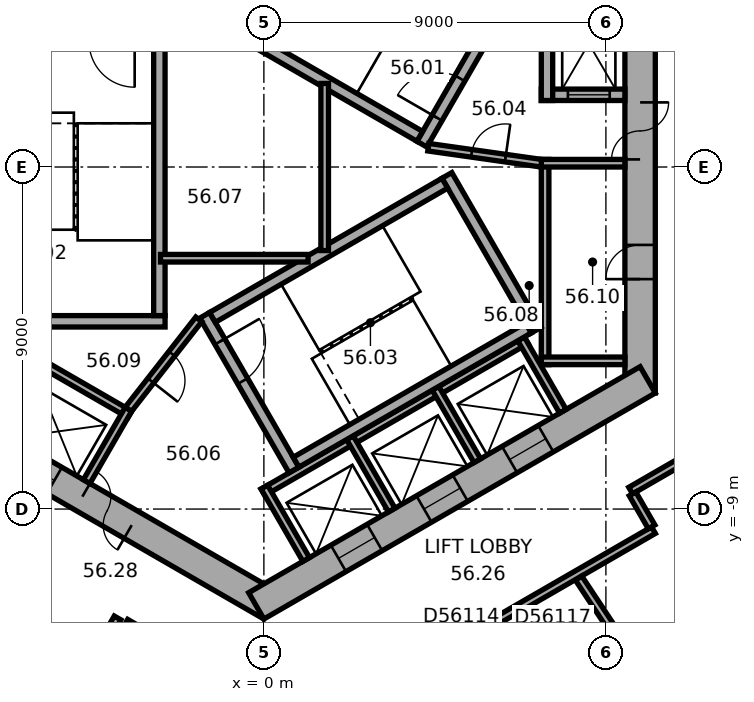
"""IFC4 building model, lengths in metres.
Left out: names, types, materials, properties, quantities, classifications, styles, units other than length and angle.
Written with IfcOpenShell. Run it as: python <this file> out.ifc"""

import sys

from ifc_helpers import new_model, si_unit, direction, frame, frame_2d, origin, place, context, subcontext, project, spatial, rectangle, extrude, element, fill, save


model = new_model("IFC4")
c1 = context("Model", 3, precision=1e-05, world=origin(), true_north=direction((0.0, 1.0)))
c2 = subcontext(c1, "Body", "Model", "MODEL_VIEW")
j1 = project(units=[si_unit("LENGTHUNIT", "METRE"), si_unit("PLANEANGLEUNIT", "RADIAN")], contexts=[c1])
p1 = place(None, origin())
s1 = spatial("IfcSite", under=j1, at=p1, CompositionType="ELEMENT")
p2 = place(p1, origin())
s2 = spatial("IfcBuilding", under=s1, at=p2, CompositionType="ELEMENT")
p3 = place(p2, frame((0.0, 0.0, 229.1)))
s3 = spatial("IfcBuildingStorey", under=s2, at=p3, CompositionType="ELEMENT", Elevation=229.1)
p4 = place(p3, frame((9.9, -5.947, 0.0), z_axis=(0.0, 0.0, 1.0), x_axis=(0.0, 1.0, 0.0)))
e1 = element("IfcWall", 1, at=p4, inside=s3, PredefinedType="SHEAR", context=c2, shape_type="SweptSolid", body=[
    extrude(rectangle(XDim=11.894, YDim=0.8, at=frame_2d((5.947, 0.0))), origin(), (0.0, 0.0, 1.0), 3.7),
])
p5 = place(p4, frame((6.147, 0.0, 0.0)))
e2 = element("IfcOpeningElement", 2, at=p5, cuts=e1, PredefinedType="OPENING", context=c2, shape_type="SweptSolid", body=[
    extrude(rectangle(XDim=1.5, YDim=2.1, at=frame_2d((0.75, 1.05))), frame((0.0, 0.41, 0.0), z_axis=(0.0, -1.0, 0.0), x_axis=(1.0, 0.0, 0.0)), (0.0, 0.0, 1.0), 0.82),
])
p6 = place(p4, frame((2.997, 0.0, 0.0)))
e3 = element("IfcOpeningElement", 3, at=p6, cuts=e1, PredefinedType="OPENING", context=c2, shape_type="SweptSolid", body=[
    extrude(rectangle(XDim=0.9, YDim=2.1, at=frame_2d((0.45, 1.05))), frame((0.0, 0.41, 0.0), z_axis=(0.0, -1.0, 0.0), x_axis=(1.0, 0.0, 0.0)), (0.0, 0.0, 1.0), 0.82),
])
p7 = place(p3, frame((-10.1, -5.6, 0.0), z_axis=(0.0, 0.0, 1.0), x_axis=(0.866023897231, -0.500002609418, 0.0)))
e4 = element("IfcWall", 4, at=p7, inside=s3, PredefinedType="SHEAR", context=c2, shape_type="SweptSolid", body=[
    extrude(rectangle(XDim=11.894, YDim=0.8, at=frame_2d((5.947, 0.0))), origin(), (0.0, 0.0, 1.0), 3.7),
])
p8 = place(p7, frame((6.147, 0.0, 0.0)))
e5 = element("IfcOpeningElement", 5, at=p8, cuts=e4, PredefinedType="OPENING", context=c2, shape_type="SweptSolid", body=[
    extrude(rectangle(XDim=1.5, YDim=2.1, at=frame_2d((0.75, 1.05))), frame((0.0, 0.41, 0.0), z_axis=(0.0, -1.0, 0.0), x_axis=(1.0, 0.0, 0.0)), (0.0, 0.0, 1.0), 0.82),
])
p9 = place(p7, frame((1.597, 0.0, 0.0)))
e6 = element("IfcOpeningElement", 6, at=p9, cuts=e4, PredefinedType="OPENING", context=c2, shape_type="SweptSolid", body=[
    extrude(rectangle(XDim=1.1, YDim=2.1, at=frame_2d((0.55, 1.05))), frame((0.0, 0.41, 0.0), z_axis=(0.0, -1.0, 0.0), x_axis=(1.0, 0.0, 0.0)), (0.0, 0.0, 1.0), 0.82),
])
p10 = place(p7, frame((4.197, 0.0, 0.0)))
e7 = element("IfcOpeningElement", 7, at=p10, cuts=e4, PredefinedType="OPENING", context=c2, shape_type="SweptSolid", body=[
    extrude(rectangle(XDim=1.1, YDim=2.1, at=frame_2d((0.55, 1.05))), frame((0.0, 0.41, 0.0), z_axis=(0.0, -1.0, 0.0), x_axis=(1.0, 0.0, 0.0)), (0.0, 0.0, 1.0), 0.82),
])
p11 = place(p3, frame((-0.2, -11.547, 0.0), z_axis=(0.0, 0.0, 1.0), x_axis=(0.866023897231, 0.500002609418, 0.0)))
e8 = element("IfcWall", 8, at=p11, inside=s3, PredefinedType="SHEAR", context=c2, shape_type="SweptSolid", body=[
    extrude(rectangle(XDim=11.894, YDim=0.8, at=frame_2d((5.947, 0.0))), origin(), (0.0, 0.0, 1.0), 3.7),
])
p12 = place(p11, frame((2.497, 0.0, 0.0)))
e9 = element("IfcOpeningElement", 9, at=p12, cuts=e8, PredefinedType="OPENING", context=c2, shape_type="SweptSolid", body=[
    extrude(rectangle(XDim=1.1, YDim=2.1, at=frame_2d((0.55, 1.05))), frame((0.0, 0.41, 0.0), z_axis=(0.0, -1.0, 0.0), x_axis=(1.0, 0.0, 0.0)), (0.0, 0.0, 1.0), 0.82),
])
p13 = place(p11, frame((5.097, 0.0, 0.0)))
e10 = element("IfcOpeningElement", 10, at=p13, cuts=e8, PredefinedType="OPENING", context=c2, shape_type="SweptSolid", body=[
    extrude(rectangle(XDim=1.1, YDim=2.1, at=frame_2d((0.55, 1.05))), frame((0.0, 0.41, 0.0), z_axis=(0.0, -1.0, 0.0), x_axis=(1.0, 0.0, 0.0)), (0.0, 0.0, 1.0), 0.82),
])
p14 = place(p11, frame((7.697, 0.0, 0.0)))
e11 = element("IfcOpeningElement", 11, at=p14, cuts=e8, PredefinedType="OPENING", context=c2, shape_type="SweptSolid", body=[
    extrude(rectangle(XDim=1.1, YDim=2.1, at=frame_2d((0.55, 1.05))), frame((0.0, 0.41, 0.0), z_axis=(0.0, -1.0, 0.0), x_axis=(1.0, 0.0, 0.0)), (0.0, 0.0, 1.0), 0.82),
])
p15 = place(p3, frame((7.4, -5.2, 0.0), z_axis=(0.0, 0.0, 1.0), x_axis=(0.0, 1.0, 0.0)))
e12 = element("IfcWall", 12, at=p15, inside=s3, PredefinedType="PARTITIONING", context=c2, shape_type="SweptSolid", body=[
    extrude(rectangle(XDim=5.4, YDim=0.2, at=frame_2d((2.7, 0.0))), origin(), (0.0, 0.0, 1.0), 3.42),
])
for number, where, z_axis, x_axis in (
    (13, (7.3, -5.1, 0.0), (0.0, 0.0, 1.0), (1.0, 0.0, 0.0)),
    (14, (7.3, 0.1, 0.0), (0.0, 0.0, 1.0), (1.0, 0.0, 0.0)),
):
    element("IfcWall", number, at=place(p3, frame(where, z_axis=z_axis, x_axis=x_axis)), inside=s3, PredefinedType="PARTITIONING", context=c2, shape_type="SweptSolid", body=[
        extrude(rectangle(XDim=2.2, YDim=0.2, at=frame_2d((1.1, 0.0))), origin(), (0.0, 0.0, 1.0), 3.42),
    ])
p16 = place(p3, frame((-8.203, -3.809, 0.0), z_axis=(0.0, 0.0, 1.0), x_axis=(0.866028230842, -0.499995103361, 0.0)))
e15 = element("IfcWall", 15, at=p16, inside=s3, PredefinedType="PARTITIONING", context=c2, shape_type="SweptSolid", body=[
    extrude(rectangle(XDim=5.4, YDim=0.2, at=frame_2d((2.7, 0.0))), origin(), (0.0, 0.0, 1.0), 3.42),
])
p17 = place(p3, frame((-3.563, -6.372, 0.0), z_axis=(0.0, 0.0, 1.0), x_axis=(-0.499994660107, -0.866028486751, 0.0)))
e16 = element("IfcWall", 16, at=p17, inside=s3, PredefinedType="PARTITIONING", context=c2, shape_type="SweptSolid", body=[
    extrude(rectangle(XDim=2.2, YDim=0.2, at=frame_2d((1.1, 0.0))), origin(), (0.0, 0.0, 1.0), 3.42),
])
p18 = place(p3, frame((-0.024, -8.559, 0.0), z_axis=(0.0, 0.0, 1.0), x_axis=(0.866026010844, 0.49999894854, 0.0)))
e17 = element("IfcWall", 17, at=p18, inside=s3, PredefinedType="PARTITIONING", context=c2, shape_type="SweptSolid", body=[
    extrude(rectangle(XDim=8.0, YDim=0.2, at=frame_2d((4.0, 0.0))), origin(), (0.0, 0.0, 1.0), 3.42),
])
for number, where, z_axis, x_axis in (
    (18, (0.013, -8.422, 0.0), (0.0, 0.0, 1.0), (0.5, -0.866, 0.0)),
    (19, (2.264, -7.122, 0.0), (0.0, 0.0, 1.0), (0.5, -0.866, 0.0)),
    (20, (4.516, -5.822, 0.0), (0.0, 0.0, 1.0), (0.5, -0.866, 0.0)),
    (21, (6.768, -4.522, 0.0), (0.0, 0.0, 1.0), (0.5, -0.866, 0.0)),
):
    element("IfcWall", number, at=place(p3, frame(where, z_axis=z_axis, x_axis=x_axis)), inside=s3, PredefinedType="PARTITIONING", context=c2, shape_type="SweptSolid", body=[
        extrude(rectangle(XDim=2.2, YDim=0.2, at=frame_2d((1.1, 0.0))), origin(), (0.0, 0.0, 1.0), 3.42),
    ])
p19 = place(p3, frame((4.158, 0.602, 0.0), z_axis=(0.0, 0.0, 1.0), x_axis=(0.499977259774, 0.866038532462, 0.0)))
e22 = element("IfcWall", 22, at=p19, inside=s3, PredefinedType="SHEAR", context=c2, shape_type="SweptSolid", body=[
    extrude(rectangle(XDim=4.7, YDim=0.3, at=frame_2d((2.35, 0.0))), origin(), (0.0, 0.0, 1.0), 3.42),
])
p20 = place(p19, frame((0.8, 0.0, 0.0)))
e23 = element("IfcOpeningElement", 23, at=p20, cuts=e22, PredefinedType="OPENING", context=c2, shape_type="SweptSolid", body=[
    extrude(rectangle(XDim=1.2, YDim=2.1, at=frame_2d((0.6, 1.05))), frame((0.0, 0.16, 0.0), z_axis=(0.0, -1.0, 0.0), x_axis=(1.0, 0.0, 0.0)), (0.0, 0.0, 1.0), 0.32),
])
p21 = place(p3, frame((4.103, 0.807, 0.0), z_axis=(0.0, 0.0, 1.0), x_axis=(-0.866027801685, 0.499995846692, 0.0)))
e24 = element("IfcWall", 24, at=p21, inside=s3, PredefinedType="SHEAR", context=c2, shape_type="SweptSolid", body=[
    extrude(rectangle(XDim=7.06, YDim=0.3, at=frame_2d((3.53, 0.0))), origin(), (0.0, 0.0, 1.0), 3.42),
])
p22 = place(p3, frame((-2.6, -4.06, 0.0), z_axis=(0.0, 0.0, 1.0), x_axis=(-1.0, 0.0, 0.0)))
e25 = element("IfcWall", 25, at=p22, inside=s3, PredefinedType="SHEAR", context=c2, shape_type="SweptSolid", body=[
    extrude(rectangle(XDim=4.7, YDim=0.3, at=frame_2d((2.35, 0.0))), origin(), (0.0, 0.0, 1.0), 3.42),
])
p23 = place(p3, frame((-2.75, 3.15, 0.0), z_axis=(0.0, 0.0, 1.0), x_axis=(0.0, -1.0, 0.0)))
e26 = element("IfcWall", 26, at=p23, inside=s3, PredefinedType="SHEAR", context=c2, shape_type="SweptSolid", body=[
    extrude(rectangle(XDim=7.06, YDim=0.3, at=frame_2d((3.53, 0.0))), origin(), (0.0, 0.0, 1.0), 3.42),
])
p24 = place(p3, frame((-1.558, -3.902, 0.0), z_axis=(0.0, 0.0, 1.0), x_axis=(0.499977259774, -0.866038532462, 0.0)))
e27 = element("IfcWall", 27, at=p24, inside=s3, PredefinedType="SHEAR", context=c2, shape_type="SweptSolid", body=[
    extrude(rectangle(XDim=4.7, YDim=0.3, at=frame_2d((2.35, 0.0))), origin(), (0.0, 0.0, 1.0), 3.42),
])
p25 = place(p24, frame((0.8, 0.0, 0.0)))
e28 = element("IfcOpeningElement", 28, at=p25, cuts=e27, PredefinedType="OPENING", context=c2, shape_type="SweptSolid", body=[
    extrude(rectangle(XDim=1.2, YDim=2.1, at=frame_2d((0.6, 1.05))), frame((0.0, 0.16, 0.0), z_axis=(0.0, -1.0, 0.0), x_axis=(1.0, 0.0, 0.0)), (0.0, 0.0, 1.0), 0.32),
])
p26 = place(p3, frame((4.816, -0.222, 0.0), z_axis=(0.0, 0.0, 1.0), x_axis=(0.499977259774, -0.866038532462, 0.0)))
e29 = element("IfcWall", 29, at=p26, inside=s3, PredefinedType="SHEAR", context=c2, shape_type="SweptSolid", body=[
    extrude(rectangle(XDim=4.7, YDim=0.3, at=frame_2d((2.35, 0.0))), origin(), (0.0, 0.0, 1.0), 3.42),
])
for number, where, z_axis, x_axis in (
    (30, (-1.353, -3.957, 0.0), (0.0, 0.0, 1.0), (0.866, 0.5, 0.0)),
    (31, (0.847, -7.767, 0.0), (0.0, 0.0, 1.0), (0.866, 0.5, 0.0)),
):
    element("IfcWall", number, at=place(p3, frame(where, z_axis=z_axis, x_axis=x_axis)), inside=s3, PredefinedType="SHEAR", context=c2, shape_type="SweptSolid", body=[
        extrude(rectangle(XDim=7.06, YDim=0.3, at=frame_2d((3.53, 0.0))), origin(), (0.0, 0.0, 1.0), 3.42),
    ])
p27 = place(p3, frame((7.3, 1.9, 0.0), z_axis=(0.0, 0.0, 1.0), x_axis=(1.0, 0.0, 0.0)))
e32 = element("IfcWall", 32, at=p27, inside=s3, PredefinedType="SHEAR", context=c2, shape_type="SweptSolid", body=[
    extrude(rectangle(XDim=2.2, YDim=0.3, at=frame_2d((1.1, 0.0))), origin(), (0.0, 0.0, 1.0), 3.42),
])
p28 = place(p27, frame((0.7, 0.0, 0.0)))
e33 = element("IfcOpeningElement", 33, at=p28, cuts=e32, PredefinedType="OPENING", context=c2, shape_type="SweptSolid", body=[
    extrude(rectangle(XDim=1.1, YDim=2.1, at=frame_2d((0.55, 1.05))), frame((0.0, 0.16, 0.0), z_axis=(0.0, -1.0, 0.0), x_axis=(1.0, 0.0, 0.0)), (0.0, 0.0, 1.0), 0.32),
])
p29 = place(p3, frame((7.45, 1.75, 0.0), z_axis=(0.0, 0.0, 1.0), x_axis=(0.0, 1.0, 0.0)))
e34 = element("IfcWall", 34, at=p29, inside=s3, PredefinedType="SHEAR", context=c2, shape_type="SweptSolid", body=[
    extrude(rectangle(XDim=3.35, YDim=0.3, at=frame_2d((1.675, 0.0))), origin(), (0.0, 0.0, 1.0), 3.42),
])
p30 = place(p3, frame((4.327, 0.521, 0.0), z_axis=(0.0, 0.0, 1.0), x_axis=(0.990124376366, -0.14019172346, 0.0)))
e35 = element("IfcWall", 35, at=p30, inside=s3, PredefinedType="PARTITIONING", context=c2, shape_type="SweptSolid", body=[
    extrude(rectangle(XDim=3.002, YDim=0.2, at=frame_2d((1.501, 0.0))), origin(), (0.0, 0.0, 1.0), 3.42),
])
p31 = place(p30, frame((1.15, 0.0, 0.0)))
e36 = element("IfcOpeningElement", 36, at=p31, cuts=e35, PredefinedType="OPENING", context=c2, shape_type="SweptSolid", body=[
    extrude(rectangle(XDim=0.9, YDim=2.1, at=frame_2d((0.45, 1.05))), frame((0.0, 0.11, 0.0), z_axis=(0.0, -1.0, 0.0), x_axis=(1.0, 0.0, 0.0)), (0.0, 0.0, 1.0), 0.22),
])
p32 = place(p3, frame((-1.712, -4.008, 0.0), z_axis=(0.0, 0.0, 1.0), x_axis=(-0.616549420702, -0.787316208287, 0.0)))
e37 = element("IfcWall", 37, at=p32, inside=s3, PredefinedType="PARTITIONING", context=c2, shape_type="SweptSolid", body=[
    extrude(rectangle(XDim=3.002, YDim=0.2, at=frame_2d((1.501, 0.0))), origin(), (0.0, 0.0, 1.0), 3.42),
])
p33 = place(p32, frame((1.15, 0.0, 0.0)))
e38 = element("IfcOpeningElement", 38, at=p33, cuts=e37, PredefinedType="OPENING", context=c2, shape_type="SweptSolid", body=[
    extrude(rectangle(XDim=0.9, YDim=2.1, at=frame_2d((0.45, 1.05))), frame((0.0, 0.11, 0.0), z_axis=(0.0, -1.0, 0.0), x_axis=(1.0, 0.0, 0.0)), (0.0, 0.0, 1.0), 0.22),
])
p34 = place(p3, frame((-2.72, -2.4, 0.0), z_axis=(0.0, 0.0, 1.0), x_axis=(1.0, 0.0, 0.0)))
e39 = element("IfcWall", 39, at=p34, inside=s3, PredefinedType="PARTITIONING", context=c2, shape_type="SweptSolid", body=[
    extrude(rectangle(XDim=3.883, YDim=0.2, at=frame_2d((1.941, 0.0))), origin(), (0.0, 0.0, 1.0), 3.42),
])
p35 = place(p3, frame((1.6, -2.198, 0.0), z_axis=(0.0, 0.0, 1.0), x_axis=(0.0, 1.0, 0.0)))
e40 = element("IfcWall", 40, at=p35, inside=s3, PredefinedType="PARTITIONING", context=c2, shape_type="SweptSolid", body=[
    extrude(rectangle(XDim=4.397, YDim=0.2, at=frame_2d((2.198, 0.0))), origin(), (0.0, 0.0, 1.0), 3.42),
])
p36 = place(p3, frame((-7.525, -18.23, 0.0), z_axis=(0.0, 0.0, 1.0), x_axis=(0.499983153418, 0.866035129944, 0.0)))
e41 = element("IfcWall", 41, at=p36, inside=s3, PredefinedType="PARTITIONING", context=c2, shape_type="SweptSolid", body=[
    extrude(rectangle(XDim=7.35, YDim=0.2, at=frame_2d((3.675, 0.0))), origin(), (0.0, 0.0, 1.0), 3.42),
])
p37 = place(p36, frame((2.975, 0.0, 0.0)))
e42 = element("IfcOpeningElement", 42, at=p37, cuts=e41, PredefinedType="OPENING", context=c2, shape_type="SweptSolid", body=[
    extrude(rectangle(XDim=1.0, YDim=2.1, at=frame_2d((0.5, 1.05))), frame((0.0, 0.11, 0.0), z_axis=(0.0, -1.0, 0.0), x_axis=(1.0, 0.0, 0.0)), (0.0, 0.0, 1.0), 0.22),
])
p38 = place(p3, frame((-3.634, -11.99, 0.0), z_axis=(0.0, 0.0, 1.0), x_axis=(0.866018616679, -0.500011755427, 0.0)))
e43 = element("IfcWall", 43, at=p38, inside=s3, PredefinedType="PARTITIONING", context=c2, shape_type="SweptSolid", body=[
    extrude(rectangle(XDim=2.8, YDim=0.2, at=frame_2d((1.4, 0.0))), origin(), (0.0, 0.0, 1.0), 3.42),
])
p39 = place(p3, frame((2.716, -13.906, 0.0), z_axis=(0.0, 0.0, 1.0), x_axis=(0.866040290674, 0.499974214264, 0.0)))
e44 = element("IfcWall", 44, at=p39, inside=s3, PredefinedType="PARTITIONING", context=c2, shape_type="SweptSolid", body=[
    extrude(rectangle(XDim=8.702, YDim=0.2, at=frame_2d((4.351, 0.0))), origin(), (0.0, 0.0, 1.0), 3.42),
])
p40 = place(p39, frame((2.679, 0.0, 0.0)))
e45 = element("IfcOpeningElement", 45, at=p40, cuts=e44, PredefinedType="OPENING", context=c2, shape_type="SweptSolid", body=[
    extrude(rectangle(XDim=1.0, YDim=2.1, at=frame_2d((0.5, 1.05))), frame((0.0, 0.11, 0.0), z_axis=(0.0, -1.0, 0.0), x_axis=(1.0, 0.0, 0.0)), (0.0, 0.0, 1.0), 0.22),
])
p41 = place(p3, frame((9.652, -8.515, 0.0), z_axis=(0.0, 0.0, 1.0), x_axis=(0.866020375458, 0.500008709215, 0.0)))
e46 = element("IfcWall", 46, at=p41, inside=s3, PredefinedType="PARTITIONING", context=c2, shape_type="SweptSolid", body=[
    extrude(rectangle(XDim=1.846, YDim=0.2, at=frame_2d((0.923, 0.0))), origin(), (0.0, 0.0, 1.0), 3.42),
])
p42 = place(p3, frame((10.202, -9.469, 0.0), z_axis=(0.0, 0.0, 1.0), x_axis=(-0.499968756647, 0.866043441391, 0.0)))
e47 = element("IfcWall", 47, at=p42, inside=s3, PredefinedType="PARTITIONING", context=c2, shape_type="SweptSolid", body=[
    extrude(rectangle(XDim=1.001, YDim=0.2, at=frame_2d((0.5, 0.0))), origin(), (0.0, 0.0, 1.0), 3.42),
])
p43 = place(p3, frame((11.571, -15.786, 0.0), z_axis=(0.0, 0.0, 1.0), x_axis=(-0.551944861763, 0.833880608705, 0.0)))
e48 = element("IfcWall", 48, at=p43, inside=s3, PredefinedType="PARTITIONING", context=c2, shape_type="SweptSolid", body=[
    extrude(rectangle(XDim=5.957, YDim=0.2, at=frame_2d((2.979, 0.0))), origin(), (0.0, 0.0, 1.0), 3.42),
])
p44 = place(p5, origin())
e49 = element("IfcDoor", 49, at=p44, inside=s3, OperationType="DOUBLE_DOOR_SINGLE_SWING", PredefinedType="DOOR", context=c2, shape_type="SweptSolid", body=[
    extrude(rectangle(XDim=1.5, YDim=2.1, at=frame_2d((0.75, 1.05))), frame((0.0, 0.025, 0.0), z_axis=(0.0, -1.0, 0.0), x_axis=(1.0, 0.0, 0.0)), (0.0, 0.0, 1.0), 0.05),
])
fill(e2, e49)
p45 = place(p8, origin())
e50 = element("IfcDoor", 50, at=p45, inside=s3, OperationType="DOUBLE_DOOR_SINGLE_SWING", PredefinedType="DOOR", context=c2, shape_type="SweptSolid", body=[
    extrude(rectangle(XDim=1.5, YDim=2.1, at=frame_2d((0.75, 1.05))), frame((0.0, 0.025, 0.0), z_axis=(0.0, -1.0, 0.0), x_axis=(1.0, 0.0, 0.0)), (0.0, 0.0, 1.0), 0.05),
])
fill(e5, e50)
p46 = place(p20, origin())
e51 = element("IfcDoor", 51, at=p46, inside=s3, OperationType="SINGLE_SWING_RIGHT", PredefinedType="DOOR", context=c2, shape_type="SweptSolid", body=[
    extrude(rectangle(XDim=1.2, YDim=2.1, at=frame_2d((0.6, 1.05))), frame((0.0, 0.025, 0.0), z_axis=(0.0, -1.0, 0.0), x_axis=(1.0, 0.0, 0.0)), (0.0, 0.0, 1.0), 0.05),
])
fill(e23, e51)
p47 = place(p25, origin())
e52 = element("IfcDoor", 52, at=p47, inside=s3, OperationType="SINGLE_SWING_RIGHT", PredefinedType="DOOR", context=c2, shape_type="SweptSolid", body=[
    extrude(rectangle(XDim=1.2, YDim=2.1, at=frame_2d((0.6, 1.05))), frame((0.0, 0.025, 0.0), z_axis=(0.0, -1.0, 0.0), x_axis=(1.0, 0.0, 0.0)), (0.0, 0.0, 1.0), 0.05),
])
fill(e28, e52)
p48 = place(p31, origin())
e53 = element("IfcDoor", 53, at=p48, inside=s3, OperationType="SINGLE_SWING_LEFT", PredefinedType="DOOR", context=c2, shape_type="SweptSolid", body=[
    extrude(rectangle(XDim=0.9, YDim=2.1, at=frame_2d((0.45, 1.05))), frame((0.0, 0.025, 0.0), z_axis=(0.0, -1.0, 0.0), x_axis=(1.0, 0.0, 0.0)), (0.0, 0.0, 1.0), 0.05),
])
fill(e36, e53)
p49 = place(p33, origin())
e54 = element("IfcDoor", 54, at=p49, inside=s3, OperationType="SINGLE_SWING_LEFT", PredefinedType="DOOR", context=c2, shape_type="SweptSolid", body=[
    extrude(rectangle(XDim=0.9, YDim=2.1, at=frame_2d((0.45, 1.05))), frame((0.0, 0.025, 0.0), z_axis=(0.0, -1.0, 0.0), x_axis=(1.0, 0.0, 0.0)), (0.0, 0.0, 1.0), 0.05),
])
fill(e38, e54)
p50 = place(p6, origin())
e55 = element("IfcDoor", 55, at=p50, inside=s3, OperationType="SINGLE_SWING_LEFT", PredefinedType="DOOR", context=c2, shape_type="SweptSolid", body=[
    extrude(rectangle(XDim=0.9, YDim=2.1, at=frame_2d((0.45, 1.05))), frame((0.0, 0.025, 0.0), z_axis=(0.0, -1.0, 0.0), x_axis=(1.0, 0.0, 0.0)), (0.0, 0.0, 1.0), 0.05),
])
fill(e3, e55)
p51 = place(p28, origin())
e56 = element("IfcDoor", 56, at=p51, inside=s3, OperationType="DOUBLE_DOOR_SLIDING", PredefinedType="DOOR", context=c2, shape_type="SweptSolid", body=[
    extrude(rectangle(XDim=1.1, YDim=2.1, at=frame_2d((0.55, 1.05))), frame((0.0, 0.025, 0.0), z_axis=(0.0, -1.0, 0.0), x_axis=(1.0, 0.0, 0.0)), (0.0, 0.0, 1.0), 0.05),
])
fill(e33, e56)
p52 = place(p10, origin())
e57 = element("IfcDoor", 57, at=p52, inside=s3, OperationType="DOUBLE_DOOR_SLIDING", PredefinedType="DOOR", context=c2, shape_type="SweptSolid", body=[
    extrude(rectangle(XDim=1.1, YDim=2.1, at=frame_2d((0.55, 1.05))), frame((0.0, 0.025, 0.0), z_axis=(0.0, -1.0, 0.0), x_axis=(1.0, 0.0, 0.0)), (0.0, 0.0, 1.0), 0.05),
])
fill(e7, e57)
p53 = place(p12, origin())
e58 = element("IfcDoor", 58, at=p53, inside=s3, OperationType="DOUBLE_DOOR_SLIDING", PredefinedType="DOOR", context=c2, shape_type="SweptSolid", body=[
    extrude(rectangle(XDim=1.1, YDim=2.1, at=frame_2d((0.55, 1.05))), frame((0.0, 0.025, 0.0), z_axis=(0.0, -1.0, 0.0), x_axis=(1.0, 0.0, 0.0)), (0.0, 0.0, 1.0), 0.05),
])
fill(e9, e58)
p54 = place(p13, origin())
e59 = element("IfcDoor", 59, at=p54, inside=s3, OperationType="DOUBLE_DOOR_SLIDING", PredefinedType="DOOR", context=c2, shape_type="SweptSolid", body=[
    extrude(rectangle(XDim=1.1, YDim=2.1, at=frame_2d((0.55, 1.05))), frame((0.0, 0.025, 0.0), z_axis=(0.0, -1.0, 0.0), x_axis=(1.0, 0.0, 0.0)), (0.0, 0.0, 1.0), 0.05),
])
fill(e10, e59)
p55 = place(p14, origin())
e60 = element("IfcDoor", 60, at=p55, inside=s3, OperationType="DOUBLE_DOOR_SLIDING", PredefinedType="DOOR", context=c2, shape_type="SweptSolid", body=[
    extrude(rectangle(XDim=1.1, YDim=2.1, at=frame_2d((0.55, 1.05))), frame((0.0, 0.025, 0.0), z_axis=(0.0, -1.0, 0.0), x_axis=(1.0, 0.0, 0.0)), (0.0, 0.0, 1.0), 0.05),
])
fill(e11, e60)
save(model, sys.argv[1])
